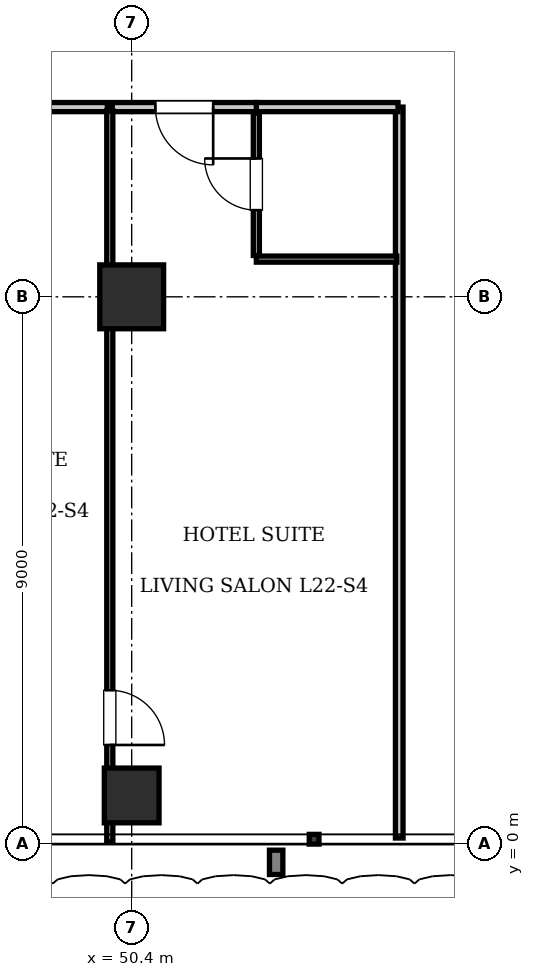
"""IFC4 building model, lengths in metres.
Left out: names, types, materials, properties, quantities, classifications, styles, units other than length and angle.
Written with IfcOpenShell. Run it as: python <this file> out.ifc"""

import sys

from ifc_helpers import new_model, si_unit, direction, frame, frame_2d, origin, origin_2d, place, context, subcontext, project, spatial, rectangle, extrude, element, fill, save


model = new_model("IFC4")
c1 = context("Model", 3, precision=1e-05, world=origin(), true_north=direction((0.0, 1.0)))
c2 = subcontext(c1, "Body", "Model", "MODEL_VIEW")
j1 = project(units=[si_unit("LENGTHUNIT", "METRE"), si_unit("PLANEANGLEUNIT", "RADIAN")], contexts=[c1])
p1 = place(None, origin())
s1 = spatial("IfcSite", under=j1, at=p1, CompositionType="ELEMENT")
p2 = place(p1, origin())
s2 = spatial("IfcBuilding", under=s1, at=p2, CompositionType="ELEMENT")
p3 = place(p2, frame((0.0, 0.0, 92.4)))
s3 = spatial("IfcBuildingStorey", under=s2, at=p3, CompositionType="ELEMENT", Elevation=92.4)
p4 = place(p3, frame((50.4, 9.0, 0.0), z_axis=(0.0, 0.0, 1.0), x_axis=(1.0, 0.0, 0.0)))
e1 = element("IfcColumn", 1, at=p4, inside=s3, PredefinedType="COLUMN", context=c2, shape_type="SweptSolid", body=[
    extrude(rectangle(XDim=1.05, YDim=1.05, at=origin_2d()), origin(), (0.0, 0.0, 1.0), 3.85),
])
p5 = place(p3, frame((50.4, 0.8, 0.0), z_axis=(0.0, 0.0, 1.0), x_axis=(1.0, 0.0, 0.0)))
e2 = element("IfcColumn", 2, at=p5, inside=s3, PredefinedType="COLUMN", context=c2, shape_type="SweptSolid", body=[
    extrude(rectangle(XDim=0.9, YDim=0.9, at=origin_2d()), origin(), (0.0, 0.0, 1.0), 3.85),
])
p6 = place(p3, frame((54.8, 0.1, 0.0), z_axis=(0.0, 0.0, 1.0), x_axis=(0.0, 1.0, 0.0)))
e3 = element("IfcWall", 3, at=p6, inside=s3, PredefinedType="PARTITIONING", context=c2, shape_type="SweptSolid", body=[
    extrude(rectangle(XDim=12.02, YDim=0.125, at=frame_2d((6.01, 0.0))), origin(), (0.0, 0.0, 1.0), 3.61),
])
p7 = place(p3, frame((52.45, 12.12, 0.0), z_axis=(0.0, 0.0, 1.0), x_axis=(1.0, 0.0, 0.0)))
e4 = element("IfcWall", 4, at=p7, inside=s3, PredefinedType="PARTITIONING", context=c2, shape_type="SweptSolid", body=[
    extrude(rectangle(XDim=2.33, YDim=0.15, at=frame_2d((1.165, 0.0))), origin(), (0.0, 0.0, 1.0), 3.61),
])
p8 = place(p3, frame((52.45, 9.62, 0.0), z_axis=(0.0, 0.0, 1.0), x_axis=(1.0, 0.0, 0.0)))
e5 = element("IfcWall", 5, at=p8, inside=s3, PredefinedType="PARTITIONING", context=c2, shape_type="SweptSolid", body=[
    extrude(rectangle(XDim=2.31, YDim=0.1, at=frame_2d((1.155, 0.0))), origin(), (0.0, 0.0, 1.0), 3.61),
])
p9 = place(p3, frame((52.45, 9.68, 0.0), z_axis=(0.0, 0.0, 1.0), x_axis=(0.0, 1.0, 0.0)))
e6 = element("IfcWall", 6, at=p9, inside=s3, PredefinedType="PARTITIONING", context=c2, shape_type="SweptSolid", body=[
    extrude(rectangle(XDim=2.34, YDim=0.1, at=frame_2d((1.17, 0.0))), origin(), (0.0, 0.0, 1.0), 3.61),
])
p10 = place(p9, frame((0.745, 0.0, 0.0)))
e7 = element("IfcOpeningElement", 7, at=p10, cuts=e6, PredefinedType="OPENING", context=c2, shape_type="SweptSolid", body=[
    extrude(rectangle(XDim=0.85, YDim=2.1, at=frame_2d((0.425, 1.05))), frame((0.0, 0.06, 0.0), z_axis=(0.0, -1.0, 0.0), x_axis=(1.0, 0.0, 0.0)), (0.0, 0.0, 1.0), 0.12),
])
p11 = place(p3, frame((46.32, 12.12, 0.0), z_axis=(0.0, 0.0, 1.0), x_axis=(1.0, 0.0, 0.0)))
e8 = element("IfcWall", 8, at=p11, inside=s3, PredefinedType="PARTITIONING", context=c2, shape_type="SweptSolid", body=[
    extrude(rectangle(XDim=3.68, YDim=0.15, at=frame_2d((1.84, 0.0))), origin(), (0.0, 0.0, 1.0), 3.61),
])
p12 = place(p3, frame((50.08, 12.12, 0.0), z_axis=(0.0, 0.0, 1.0), x_axis=(1.0, 0.0, 0.0)))
e9 = element("IfcWall", 9, at=p12, inside=s3, PredefinedType="PARTITIONING", context=c2, shape_type="SweptSolid", body=[
    extrude(rectangle(XDim=2.37, YDim=0.15, at=frame_2d((1.185, 0.0))), origin(), (0.0, 0.0, 1.0), 3.61),
])
p13 = place(p12, frame((0.71, 0.0, 0.0)))
e10 = element("IfcOpeningElement", 10, at=p13, cuts=e9, PredefinedType="OPENING", context=c2, shape_type="SweptSolid", body=[
    extrude(rectangle(XDim=0.95, YDim=2.15, at=frame_2d((0.475, 1.075))), frame((0.0, 0.085, 0.0), z_axis=(0.0, -1.0, 0.0), x_axis=(1.0, 0.0, 0.0)), (0.0, 0.0, 1.0), 0.17),
])
p14 = place(p3, frame((50.04, 0.03, 0.0), z_axis=(0.0, 0.0, 1.0), x_axis=(0.0, 1.0, 0.0)))
e11 = element("IfcWall", 11, at=p14, inside=s3, PredefinedType="PARTITIONING", context=c2, shape_type="SweptSolid", body=[
    extrude(rectangle(XDim=12.03, YDim=0.1, at=frame_2d((6.015, 0.0))), origin(), (0.0, 0.0, 1.0), 3.61),
])
p15 = place(p14, frame((1.6, 0.0, 0.0)))
e12 = element("IfcOpeningElement", 12, at=p15, cuts=e11, PredefinedType="OPENING", context=c2, shape_type="SweptSolid", body=[
    extrude(rectangle(XDim=0.9, YDim=2.1, at=frame_2d((0.45, 1.05))), frame((0.0, 0.06, 0.0), z_axis=(0.0, -1.0, 0.0), x_axis=(1.0, 0.0, 0.0)), (0.0, 0.0, 1.0), 0.12),
])
p16 = place(p10, origin())
e13 = element("IfcDoor", 13, at=p16, inside=s3, OperationType="SINGLE_SWING_RIGHT", PredefinedType="DOOR", context=c2, shape_type="SweptSolid", body=[
    extrude(rectangle(XDim=0.85, YDim=2.1, at=frame_2d((0.425, 1.05))), frame((0.0, 0.025, 0.0), z_axis=(0.0, -1.0, 0.0), x_axis=(1.0, 0.0, 0.0)), (0.0, 0.0, 1.0), 0.05),
])
fill(e7, e13)
p17 = place(p13, frame((0.95, 0.0, 0.0), z_axis=(0.0, 0.0, 1.0), x_axis=(-1.0, 0.0, 0.0)))
e14 = element("IfcDoor", 14, at=p17, inside=s3, OperationType="SINGLE_SWING_LEFT", PredefinedType="DOOR", context=c2, shape_type="SweptSolid", body=[
    extrude(rectangle(XDim=0.95, YDim=2.15, at=frame_2d((0.475, 1.075))), frame((0.0, 0.025, 0.0), z_axis=(0.0, -1.0, 0.0), x_axis=(1.0, 0.0, 0.0)), (0.0, 0.0, 1.0), 0.05),
])
fill(e10, e14)
p18 = place(p15, frame((0.9, 0.0, 0.0), z_axis=(0.0, 0.0, 1.0), x_axis=(-1.0, 0.0, 0.0)))
e15 = element("IfcDoor", 15, at=p18, inside=s3, OperationType="SINGLE_SWING_RIGHT", PredefinedType="DOOR", context=c2, shape_type="SweptSolid", body=[
    extrude(rectangle(XDim=0.9, YDim=2.1, at=frame_2d((0.45, 1.05))), frame((0.0, 0.025, 0.0), z_axis=(0.0, -1.0, 0.0), x_axis=(1.0, 0.0, 0.0)), (0.0, 0.0, 1.0), 0.05),
])
fill(e12, e15)
save(model, sys.argv[1])
